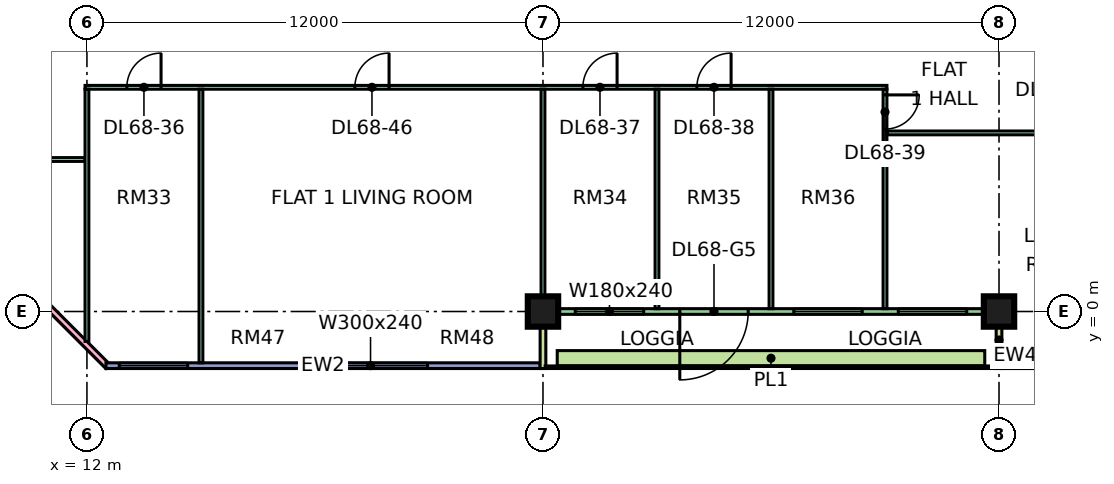
"""IFC4 building model, lengths in metres.
Left out: names, types, materials, properties, quantities, classifications, styles, units other than length and angle.
Written with IfcOpenShell. Run it as: python <this file> out.ifc"""

import sys

from ifc_helpers import new_model, si_unit, direction, frame, frame_2d, origin, origin_2d, place, context, subcontext, project, spatial, rectangle, extrude, element, fill, save


model = new_model("IFC4")
c1 = context("Model", 3, precision=1e-05, world=origin(), true_north=direction((0.0, 1.0)))
c2 = subcontext(c1, "Body", "Model", "MODEL_VIEW")
j1 = project(units=[si_unit("LENGTHUNIT", "METRE"), si_unit("PLANEANGLEUNIT", "RADIAN")], contexts=[c1])
p1 = place(None, origin())
s1 = spatial("IfcSite", under=j1, at=p1, CompositionType="ELEMENT")
p2 = place(p1, origin())
s2 = spatial("IfcBuilding", under=s1, at=p2, CompositionType="ELEMENT")
p3 = place(p2, frame((0.0, 0.0, 292.15)))
s3 = spatial("IfcBuildingStorey", under=s2, at=p3, CompositionType="ELEMENT", Elevation=292.15)
for number, where, z_axis, x_axis in (
    (1, (24.0, 0.0, 0.0), (0.0, 0.0, 1.0), (1.0, 0.0, 0.0)),
    (2, (36.0, 0.0, 0.0), (0.0, 0.0, 1.0), (1.0, 0.0, 0.0)),
):
    element("IfcColumn", number, at=place(p3, frame(where, z_axis=z_axis, x_axis=x_axis)), inside=s3, PredefinedType="COLUMN", context=c2, shape_type="SweptSolid", body=[
        extrude(rectangle(XDim=0.8, YDim=0.8, at=origin_2d()), origin(), (0.0, 0.0, 1.0), 3.75),
    ])
p4 = place(p3, frame((-1.447, 12.553, 0.0), z_axis=(0.0, 0.0, 1.0), x_axis=(0.707106781187, -0.707106781187, 0.0)))
e3 = element("IfcWall", 3, at=p4, inside=s3, PredefinedType="SOLIDWALL", context=c2, shape_type="SweptSolid", body=[
    extrude(rectangle(XDim=19.799, YDim=0.15, at=frame_2d((9.899, 0.0))), origin(), (0.0, 0.0, 1.0), 3.35),
])
p5 = place(p4, frame((2.212, 0.0, 0.45)))
e4 = element("IfcOpeningElement", 4, at=p5, cuts=e3, PredefinedType="OPENING", context=c2, shape_type="SweptSolid", body=[
    extrude(rectangle(XDim=3.0, YDim=2.4, at=frame_2d((1.5, 1.2))), frame((0.0, 0.085, 0.0), z_axis=(0.0, -1.0, 0.0), x_axis=(1.0, 0.0, 0.0)), (0.0, 0.0, 1.0), 0.17),
])
p6 = place(p4, frame((10.216, 0.0, 0.45)))
e5 = element("IfcOpeningElement", 5, at=p6, cuts=e3, PredefinedType="OPENING", context=c2, shape_type="SweptSolid", body=[
    extrude(rectangle(XDim=3.0, YDim=2.4, at=frame_2d((1.5, 1.2))), frame((0.0, 0.085, 0.0), z_axis=(0.0, -1.0, 0.0), x_axis=(1.0, 0.0, 0.0)), (0.0, 0.0, 1.0), 0.17),
])
p7 = place(p3, frame((12.5, -1.425, 0.0), z_axis=(0.0, 0.0, 1.0), x_axis=(1.0, 0.0, 0.0)))
e6 = element("IfcWall", 6, at=p7, inside=s3, PredefinedType="SOLIDWALL", context=c2, shape_type="SweptSolid", body=[
    extrude(rectangle(XDim=11.425, YDim=0.15, at=frame_2d((5.712, 0.0))), origin(), (0.0, 0.0, 1.0), 3.35),
])
p8 = place(p7, frame((0.35, 0.0, 0.45)))
e7 = element("IfcOpeningElement", 7, at=p8, cuts=e6, PredefinedType="OPENING", context=c2, shape_type="SweptSolid", body=[
    extrude(rectangle(XDim=1.8, YDim=2.4, at=frame_2d((0.9, 1.2))), frame((0.0, 0.085, 0.0), z_axis=(0.0, -1.0, 0.0), x_axis=(1.0, 0.0, 0.0)), (0.0, 0.0, 1.0), 0.17),
])
p9 = place(p7, frame((5.462, 0.0, 0.45)))
e8 = element("IfcOpeningElement", 8, at=p9, cuts=e6, PredefinedType="OPENING", context=c2, shape_type="SweptSolid", body=[
    extrude(rectangle(XDim=3.0, YDim=2.4, at=frame_2d((1.5, 1.2))), frame((0.0, 0.085, 0.0), z_axis=(0.0, -1.0, 0.0), x_axis=(1.0, 0.0, 0.0)), (0.0, 0.0, 1.0), 0.17),
])
p10 = place(p3, frame((24.075, 0.0, 0.0), z_axis=(0.0, 0.0, 1.0), x_axis=(1.0, 0.0, 0.0)))
e9 = element("IfcWall", 9, at=p10, inside=s3, PredefinedType="SOLIDWALL", context=c2, shape_type="SweptSolid", body=[
    extrude(rectangle(XDim=11.85, YDim=0.15, at=frame_2d((5.925, 0.0))), origin(), (0.0, 0.0, 1.0), 3.35),
])
p11 = place(p10, frame((0.775, 0.0, 0.45)))
e10 = element("IfcOpeningElement", 10, at=p11, cuts=e9, PredefinedType="OPENING", context=c2, shape_type="SweptSolid", body=[
    extrude(rectangle(XDim=1.8, YDim=2.4, at=frame_2d((0.9, 1.2))), frame((0.0, 0.085, 0.0), z_axis=(0.0, -1.0, 0.0), x_axis=(1.0, 0.0, 0.0)), (0.0, 0.0, 1.0), 0.17),
])
p12 = place(p10, frame((3.525, 0.0, 0.0)))
e11 = element("IfcOpeningElement", 11, at=p12, cuts=e9, PredefinedType="OPENING", context=c2, shape_type="SweptSolid", body=[
    extrude(rectangle(XDim=1.8, YDim=2.4, at=frame_2d((0.9, 1.2))), frame((0.0, 0.085, 0.0), z_axis=(0.0, -1.0, 0.0), x_axis=(1.0, 0.0, 0.0)), (0.0, 0.0, 1.0), 0.17),
])
p13 = place(p10, frame((6.525, 0.0, 0.45)))
e12 = element("IfcOpeningElement", 12, at=p13, cuts=e9, PredefinedType="OPENING", context=c2, shape_type="SweptSolid", body=[
    extrude(rectangle(XDim=1.8, YDim=2.4, at=frame_2d((0.9, 1.2))), frame((0.0, 0.085, 0.0), z_axis=(0.0, -1.0, 0.0), x_axis=(1.0, 0.0, 0.0)), (0.0, 0.0, 1.0), 0.17),
])
p14 = place(p10, frame((9.275, 0.0, 0.45)))
e13 = element("IfcOpeningElement", 13, at=p14, cuts=e9, PredefinedType="OPENING", context=c2, shape_type="SweptSolid", body=[
    extrude(rectangle(XDim=1.8, YDim=2.4, at=frame_2d((0.9, 1.2))), frame((0.0, 0.085, 0.0), z_axis=(0.0, -1.0, 0.0), x_axis=(1.0, 0.0, 0.0)), (0.0, 0.0, 1.0), 0.17),
])
for number, where, z_axis, x_axis in (
    (14, (24.0, -1.5, 0.0), (0.0, 0.0, 1.0), (0.0, 1.0, 0.0)),
    (15, (36.0, -1.5, 0.0), (0.0, 0.0, 1.0), (0.0, 1.0, 0.0)),
):
    element("IfcWall", number, at=place(p3, frame(where, z_axis=z_axis, x_axis=x_axis)), inside=s3, PredefinedType="SOLIDWALL", context=c2, shape_type="SweptSolid", body=[
        extrude(rectangle(XDim=1.5, YDim=0.15, at=frame_2d((0.75, 0.0))), origin(), (0.0, 0.0, 1.0), 3.35),
    ])
p15 = place(p3, frame((36.075, -1.425, 0.0), z_axis=(0.0, 0.0, 1.0), x_axis=(1.0, 0.0, 0.0)))
e16 = element("IfcWall", 16, at=p15, inside=s3, PredefinedType="SOLIDWALL", context=c2, shape_type="SweptSolid", body=[
    extrude(rectangle(XDim=11.85, YDim=0.15, at=frame_2d((5.925, 0.0))), origin(), (0.0, 0.0, 1.0), 3.35),
])
p16 = place(p15, frame((1.462, 0.0, 0.45)))
e17 = element("IfcOpeningElement", 17, at=p16, cuts=e16, PredefinedType="OPENING", context=c2, shape_type="SweptSolid", body=[
    extrude(rectangle(XDim=3.0, YDim=2.4, at=frame_2d((1.5, 1.2))), frame((0.0, 0.085, 0.0), z_axis=(0.0, -1.0, 0.0), x_axis=(1.0, 0.0, 0.0)), (0.0, 0.0, 1.0), 0.17),
])
p17 = place(p15, frame((6.525, 0.0, 0.45)))
e18 = element("IfcOpeningElement", 18, at=p17, cuts=e16, PredefinedType="OPENING", context=c2, shape_type="SweptSolid", body=[
    extrude(rectangle(XDim=1.8, YDim=2.4, at=frame_2d((0.9, 1.2))), frame((0.0, 0.085, 0.0), z_axis=(0.0, -1.0, 0.0), x_axis=(1.0, 0.0, 0.0)), (0.0, 0.0, 1.0), 0.17),
])
p18 = place(p15, frame((9.488, 0.0, 0.45)))
e19 = element("IfcOpeningElement", 19, at=p18, cuts=e16, PredefinedType="OPENING", context=c2, shape_type="SweptSolid", body=[
    extrude(rectangle(XDim=1.8, YDim=2.4, at=frame_2d((0.9, 1.2))), frame((0.0, 0.085, 0.0), z_axis=(0.0, -1.0, 0.0), x_axis=(1.0, 0.0, 0.0)), (0.0, 0.0, 1.0), 0.17),
])
p19 = place(p3, frame((24.375, -1.229, 0.0), z_axis=(0.0, 0.0, 1.0), x_axis=(1.0, 0.0, 0.0)))
e20 = element("IfcWall", 20, at=p19, inside=s3, PredefinedType="SOLIDWALL", context=c2, shape_type="SweptSolid", body=[
    extrude(rectangle(XDim=11.25, YDim=0.4, at=frame_2d((5.625, 0.0))), origin(), (0.0, 0.0, 1.0), 0.7),
])
p20 = place(p3, frame((9.05, 4.0, 0.0), z_axis=(0.0, 0.0, 1.0), x_axis=(1.0, 0.0, 0.0)))
e21 = element("IfcWall", 21, at=p20, inside=s3, PredefinedType="PARTITIONING", context=c2, shape_type="SweptSolid", body=[
    extrude(rectangle(XDim=2.9, YDim=0.1, at=frame_2d((1.45, 0.0))), origin(), (0.0, 0.0, 1.0), 3.35),
])
p21 = place(p3, frame((11.95, 5.9, 0.0), z_axis=(0.0, 0.0, 1.0), x_axis=(1.0, 0.0, 0.0)))
e22 = element("IfcWall", 22, at=p21, inside=s3, PredefinedType="PARTITIONING", context=c2, shape_type="SweptSolid", body=[
    extrude(rectangle(XDim=21.1, YDim=0.1, at=frame_2d((10.55, 0.0))), origin(), (0.0, 0.0, 1.0), 3.35),
])
p22 = place(p21, frame((1.1, 0.0, 0.0)))
e23 = element("IfcOpeningElement", 23, at=p22, cuts=e22, PredefinedType="OPENING", context=c2, shape_type="SweptSolid", body=[
    extrude(rectangle(XDim=0.9, YDim=2.1, at=frame_2d((0.45, 1.05))), frame((0.0, 0.06, 0.0), z_axis=(0.0, -1.0, 0.0), x_axis=(1.0, 0.0, 0.0)), (0.0, 0.0, 1.0), 0.12),
])
p23 = place(p21, frame((13.1, 0.0, 0.0)))
e24 = element("IfcOpeningElement", 24, at=p23, cuts=e22, PredefinedType="OPENING", context=c2, shape_type="SweptSolid", body=[
    extrude(rectangle(XDim=0.9, YDim=2.1, at=frame_2d((0.45, 1.05))), frame((0.0, 0.06, 0.0), z_axis=(0.0, -1.0, 0.0), x_axis=(1.0, 0.0, 0.0)), (0.0, 0.0, 1.0), 0.12),
])
p24 = place(p21, frame((16.1, 0.0, 0.0)))
e25 = element("IfcOpeningElement", 25, at=p24, cuts=e22, PredefinedType="OPENING", context=c2, shape_type="SweptSolid", body=[
    extrude(rectangle(XDim=0.9, YDim=2.1, at=frame_2d((0.45, 1.05))), frame((0.0, 0.06, 0.0), z_axis=(0.0, -1.0, 0.0), x_axis=(1.0, 0.0, 0.0)), (0.0, 0.0, 1.0), 0.12),
])
p25 = place(p21, frame((7.1, 0.0, 0.0)))
e26 = element("IfcOpeningElement", 26, at=p25, cuts=e22, PredefinedType="OPENING", context=c2, shape_type="SweptSolid", body=[
    extrude(rectangle(XDim=0.9, YDim=2.1, at=frame_2d((0.45, 1.05))), frame((0.0, 0.06, 0.0), z_axis=(0.0, -1.0, 0.0), x_axis=(1.0, 0.0, 0.0)), (0.0, 0.0, 1.0), 0.12),
])
p26 = place(p3, frame((12.0, -0.788, 0.0), z_axis=(0.0, 0.0, 1.0), x_axis=(0.0, 1.0, 0.0)))
e27 = element("IfcWall", 27, at=p26, inside=s3, PredefinedType="PARTITIONING", context=c2, shape_type="SweptSolid", body=[
    extrude(rectangle(XDim=6.638, YDim=0.1, at=frame_2d((3.319, 0.0))), origin(), (0.0, 0.0, 1.0), 3.35),
])
p27 = place(p3, frame((15.0, -1.35, 0.0), z_axis=(0.0, 0.0, 1.0), x_axis=(0.0, 1.0, 0.0)))
e28 = element("IfcWall", 28, at=p27, inside=s3, PredefinedType="PARTITIONING", context=c2, shape_type="SweptSolid", body=[
    extrude(rectangle(XDim=7.2, YDim=0.1, at=frame_2d((3.6, 0.0))), origin(), (0.0, 0.0, 1.0), 3.35),
])
p28 = place(p3, frame((24.0, 0.0, 0.0), z_axis=(0.0, 0.0, 1.0), x_axis=(0.0, 1.0, 0.0)))
e29 = element("IfcWall", 29, at=p28, inside=s3, PredefinedType="PARTITIONING", context=c2, shape_type="SweptSolid", body=[
    extrude(rectangle(XDim=5.85, YDim=0.1, at=frame_2d((2.925, 0.0))), origin(), (0.0, 0.0, 1.0), 3.35),
])
for number, where, z_axis, x_axis in (
    (30, (27.0, 0.074, 0.0), (0.0, 0.0, 1.0), (0.0, 1.0, 0.0)),
    (31, (30.0, 0.074, 0.0), (0.0, 0.0, 1.0), (0.0, 1.0, 0.0)),
):
    element("IfcWall", number, at=place(p3, frame(where, z_axis=z_axis, x_axis=x_axis)), inside=s3, PredefinedType="PARTITIONING", context=c2, shape_type="SweptSolid", body=[
        extrude(rectangle(XDim=5.776, YDim=0.1, at=frame_2d((2.888, 0.0))), origin(), (0.0, 0.0, 1.0), 3.35),
    ])
p29 = place(p3, frame((33.0, 0.074, 0.0), z_axis=(0.0, 0.0, 1.0), x_axis=(0.0, 1.0, 0.0)))
e32 = element("IfcWall", 32, at=p29, inside=s3, PredefinedType="PARTITIONING", context=c2, shape_type="SweptSolid", body=[
    extrude(rectangle(XDim=5.776, YDim=0.1, at=frame_2d((2.888, 0.0))), origin(), (0.0, 0.0, 1.0), 3.35),
])
p30 = place(p29, frame((4.726, 0.0, 0.0)))
e33 = element("IfcOpeningElement", 33, at=p30, cuts=e32, PredefinedType="OPENING", context=c2, shape_type="SweptSolid", body=[
    extrude(rectangle(XDim=0.9, YDim=2.1, at=frame_2d((0.45, 1.05))), frame((0.0, 0.06, 0.0), z_axis=(0.0, -1.0, 0.0), x_axis=(1.0, 0.0, 0.0)), (0.0, 0.0, 1.0), 0.12),
])
p31 = place(p3, frame((33.05, 4.7, 0.0), z_axis=(0.0, 0.0, 1.0), x_axis=(1.0, 0.0, 0.0)))
e34 = element("IfcWall", 34, at=p31, inside=s3, PredefinedType="PARTITIONING", context=c2, shape_type="SweptSolid", body=[
    extrude(rectangle(XDim=14.85, YDim=0.1, at=frame_2d((7.425, 0.0))), origin(), (0.0, 0.0, 1.0), 3.35),
])
p32 = place(p31, frame((10.0, 0.0, 0.0)))
e35 = element("IfcOpeningElement", 35, at=p32, cuts=e34, PredefinedType="OPENING", context=c2, shape_type="SweptSolid", body=[
    extrude(rectangle(XDim=0.9, YDim=2.1, at=frame_2d((0.45, 1.05))), frame((0.0, 0.06, 0.0), z_axis=(0.0, -1.0, 0.0), x_axis=(1.0, 0.0, 0.0)), (0.0, 0.0, 1.0), 0.12),
])
p33 = place(p31, frame((13.0, 0.0, 0.0)))
e36 = element("IfcOpeningElement", 36, at=p33, cuts=e34, PredefinedType="OPENING", context=c2, shape_type="SweptSolid", body=[
    extrude(rectangle(XDim=0.9, YDim=2.1, at=frame_2d((0.45, 1.05))), frame((0.0, 0.06, 0.0), z_axis=(0.0, -1.0, 0.0), x_axis=(1.0, 0.0, 0.0)), (0.0, 0.0, 1.0), 0.12),
])
p34 = place(p31, frame((4.0, 0.0, 0.0)))
e37 = element("IfcOpeningElement", 37, at=p34, cuts=e34, PredefinedType="OPENING", context=c2, shape_type="SweptSolid", body=[
    extrude(rectangle(XDim=0.9, YDim=2.1, at=frame_2d((0.45, 1.05))), frame((0.0, 0.06, 0.0), z_axis=(0.0, -1.0, 0.0), x_axis=(1.0, 0.0, 0.0)), (0.0, 0.0, 1.0), 0.12),
])
p35 = place(p8, origin())
e38 = element("IfcWindow", 38, at=p35, inside=s3, PartitioningType="SINGLE_PANEL", PredefinedType="WINDOW", context=c2, shape_type="SweptSolid", body=[
    extrude(rectangle(XDim=1.8, YDim=2.4, at=frame_2d((0.9, 1.2))), frame((0.0, 0.03, 0.0), z_axis=(0.0, -1.0, 0.0), x_axis=(1.0, 0.0, 0.0)), (0.0, 0.0, 1.0), 0.06),
])
fill(e7, e38)
p36 = place(p9, origin())
e39 = element("IfcWindow", 39, at=p36, inside=s3, PartitioningType="SINGLE_PANEL", PredefinedType="WINDOW", context=c2, shape_type="SweptSolid", body=[
    extrude(rectangle(XDim=3.0, YDim=2.4, at=frame_2d((1.5, 1.2))), frame((0.0, 0.03, 0.0), z_axis=(0.0, -1.0, 0.0), x_axis=(1.0, 0.0, 0.0)), (0.0, 0.0, 1.0), 0.06),
])
fill(e8, e39)
p37 = place(p11, origin())
e40 = element("IfcWindow", 40, at=p37, inside=s3, PartitioningType="SINGLE_PANEL", PredefinedType="WINDOW", context=c2, shape_type="SweptSolid", body=[
    extrude(rectangle(XDim=1.8, YDim=2.4, at=frame_2d((0.9, 1.2))), frame((0.0, 0.03, 0.0), z_axis=(0.0, -1.0, 0.0), x_axis=(1.0, 0.0, 0.0)), (0.0, 0.0, 1.0), 0.06),
])
fill(e10, e40)
p38 = place(p12, frame((1.8, 0.0, 0.0), z_axis=(0.0, 0.0, 1.0), x_axis=(-1.0, 0.0, 0.0)))
e41 = element("IfcDoor", 41, at=p38, inside=s3, OperationType="DOUBLE_DOOR_SINGLE_SWING", PredefinedType="DOOR", context=c2, shape_type="SweptSolid", body=[
    extrude(rectangle(XDim=1.8, YDim=2.4, at=frame_2d((0.9, 1.2))), frame((0.0, 0.025, 0.0), z_axis=(0.0, -1.0, 0.0), x_axis=(1.0, 0.0, 0.0)), (0.0, 0.0, 1.0), 0.05),
])
fill(e11, e41)
p39 = place(p13, origin())
e42 = element("IfcWindow", 42, at=p39, inside=s3, PartitioningType="SINGLE_PANEL", PredefinedType="WINDOW", context=c2, shape_type="SweptSolid", body=[
    extrude(rectangle(XDim=1.8, YDim=2.4, at=frame_2d((0.9, 1.2))), frame((0.0, 0.03, 0.0), z_axis=(0.0, -1.0, 0.0), x_axis=(1.0, 0.0, 0.0)), (0.0, 0.0, 1.0), 0.06),
])
fill(e12, e42)
p40 = place(p14, origin())
e43 = element("IfcWindow", 43, at=p40, inside=s3, PartitioningType="SINGLE_PANEL", PredefinedType="WINDOW", context=c2, shape_type="SweptSolid", body=[
    extrude(rectangle(XDim=1.8, YDim=2.4, at=frame_2d((0.9, 1.2))), frame((0.0, 0.03, 0.0), z_axis=(0.0, -1.0, 0.0), x_axis=(1.0, 0.0, 0.0)), (0.0, 0.0, 1.0), 0.06),
])
fill(e13, e43)
p41 = place(p22, frame((0.9, 0.0, 0.0), z_axis=(0.0, 0.0, 1.0), x_axis=(-1.0, 0.0, 0.0)))
e44 = element("IfcDoor", 44, at=p41, inside=s3, OperationType="SINGLE_SWING_RIGHT", PredefinedType="DOOR", context=c2, shape_type="SweptSolid", body=[
    extrude(rectangle(XDim=0.9, YDim=2.1, at=frame_2d((0.45, 1.05))), frame((0.0, 0.025, 0.0), z_axis=(0.0, -1.0, 0.0), x_axis=(1.0, 0.0, 0.0)), (0.0, 0.0, 1.0), 0.05),
])
fill(e23, e44)
p42 = place(p23, frame((0.9, 0.0, 0.0), z_axis=(0.0, 0.0, 1.0), x_axis=(-1.0, 0.0, 0.0)))
e45 = element("IfcDoor", 45, at=p42, inside=s3, OperationType="SINGLE_SWING_RIGHT", PredefinedType="DOOR", context=c2, shape_type="SweptSolid", body=[
    extrude(rectangle(XDim=0.9, YDim=2.1, at=frame_2d((0.45, 1.05))), frame((0.0, 0.025, 0.0), z_axis=(0.0, -1.0, 0.0), x_axis=(1.0, 0.0, 0.0)), (0.0, 0.0, 1.0), 0.05),
])
fill(e24, e45)
p43 = place(p24, frame((0.9, 0.0, 0.0), z_axis=(0.0, 0.0, 1.0), x_axis=(-1.0, 0.0, 0.0)))
e46 = element("IfcDoor", 46, at=p43, inside=s3, OperationType="SINGLE_SWING_RIGHT", PredefinedType="DOOR", context=c2, shape_type="SweptSolid", body=[
    extrude(rectangle(XDim=0.9, YDim=2.1, at=frame_2d((0.45, 1.05))), frame((0.0, 0.025, 0.0), z_axis=(0.0, -1.0, 0.0), x_axis=(1.0, 0.0, 0.0)), (0.0, 0.0, 1.0), 0.05),
])
fill(e25, e46)
p44 = place(p30, origin())
e47 = element("IfcDoor", 47, at=p44, inside=s3, OperationType="SINGLE_SWING_RIGHT", PredefinedType="DOOR", context=c2, shape_type="SweptSolid", body=[
    extrude(rectangle(XDim=0.9, YDim=2.1, at=frame_2d((0.45, 1.05))), frame((0.0, 0.025, 0.0), z_axis=(0.0, -1.0, 0.0), x_axis=(1.0, 0.0, 0.0)), (0.0, 0.0, 1.0), 0.05),
])
fill(e33, e47)
p45 = place(p25, frame((0.9, 0.0, 0.0), z_axis=(0.0, 0.0, 1.0), x_axis=(-1.0, 0.0, 0.0)))
e48 = element("IfcDoor", 48, at=p45, inside=s3, OperationType="SINGLE_SWING_RIGHT", PredefinedType="DOOR", context=c2, shape_type="SweptSolid", body=[
    extrude(rectangle(XDim=0.9, YDim=2.1, at=frame_2d((0.45, 1.05))), frame((0.0, 0.025, 0.0), z_axis=(0.0, -1.0, 0.0), x_axis=(1.0, 0.0, 0.0)), (0.0, 0.0, 1.0), 0.05),
])
fill(e26, e48)
save(model, sys.argv[1])
